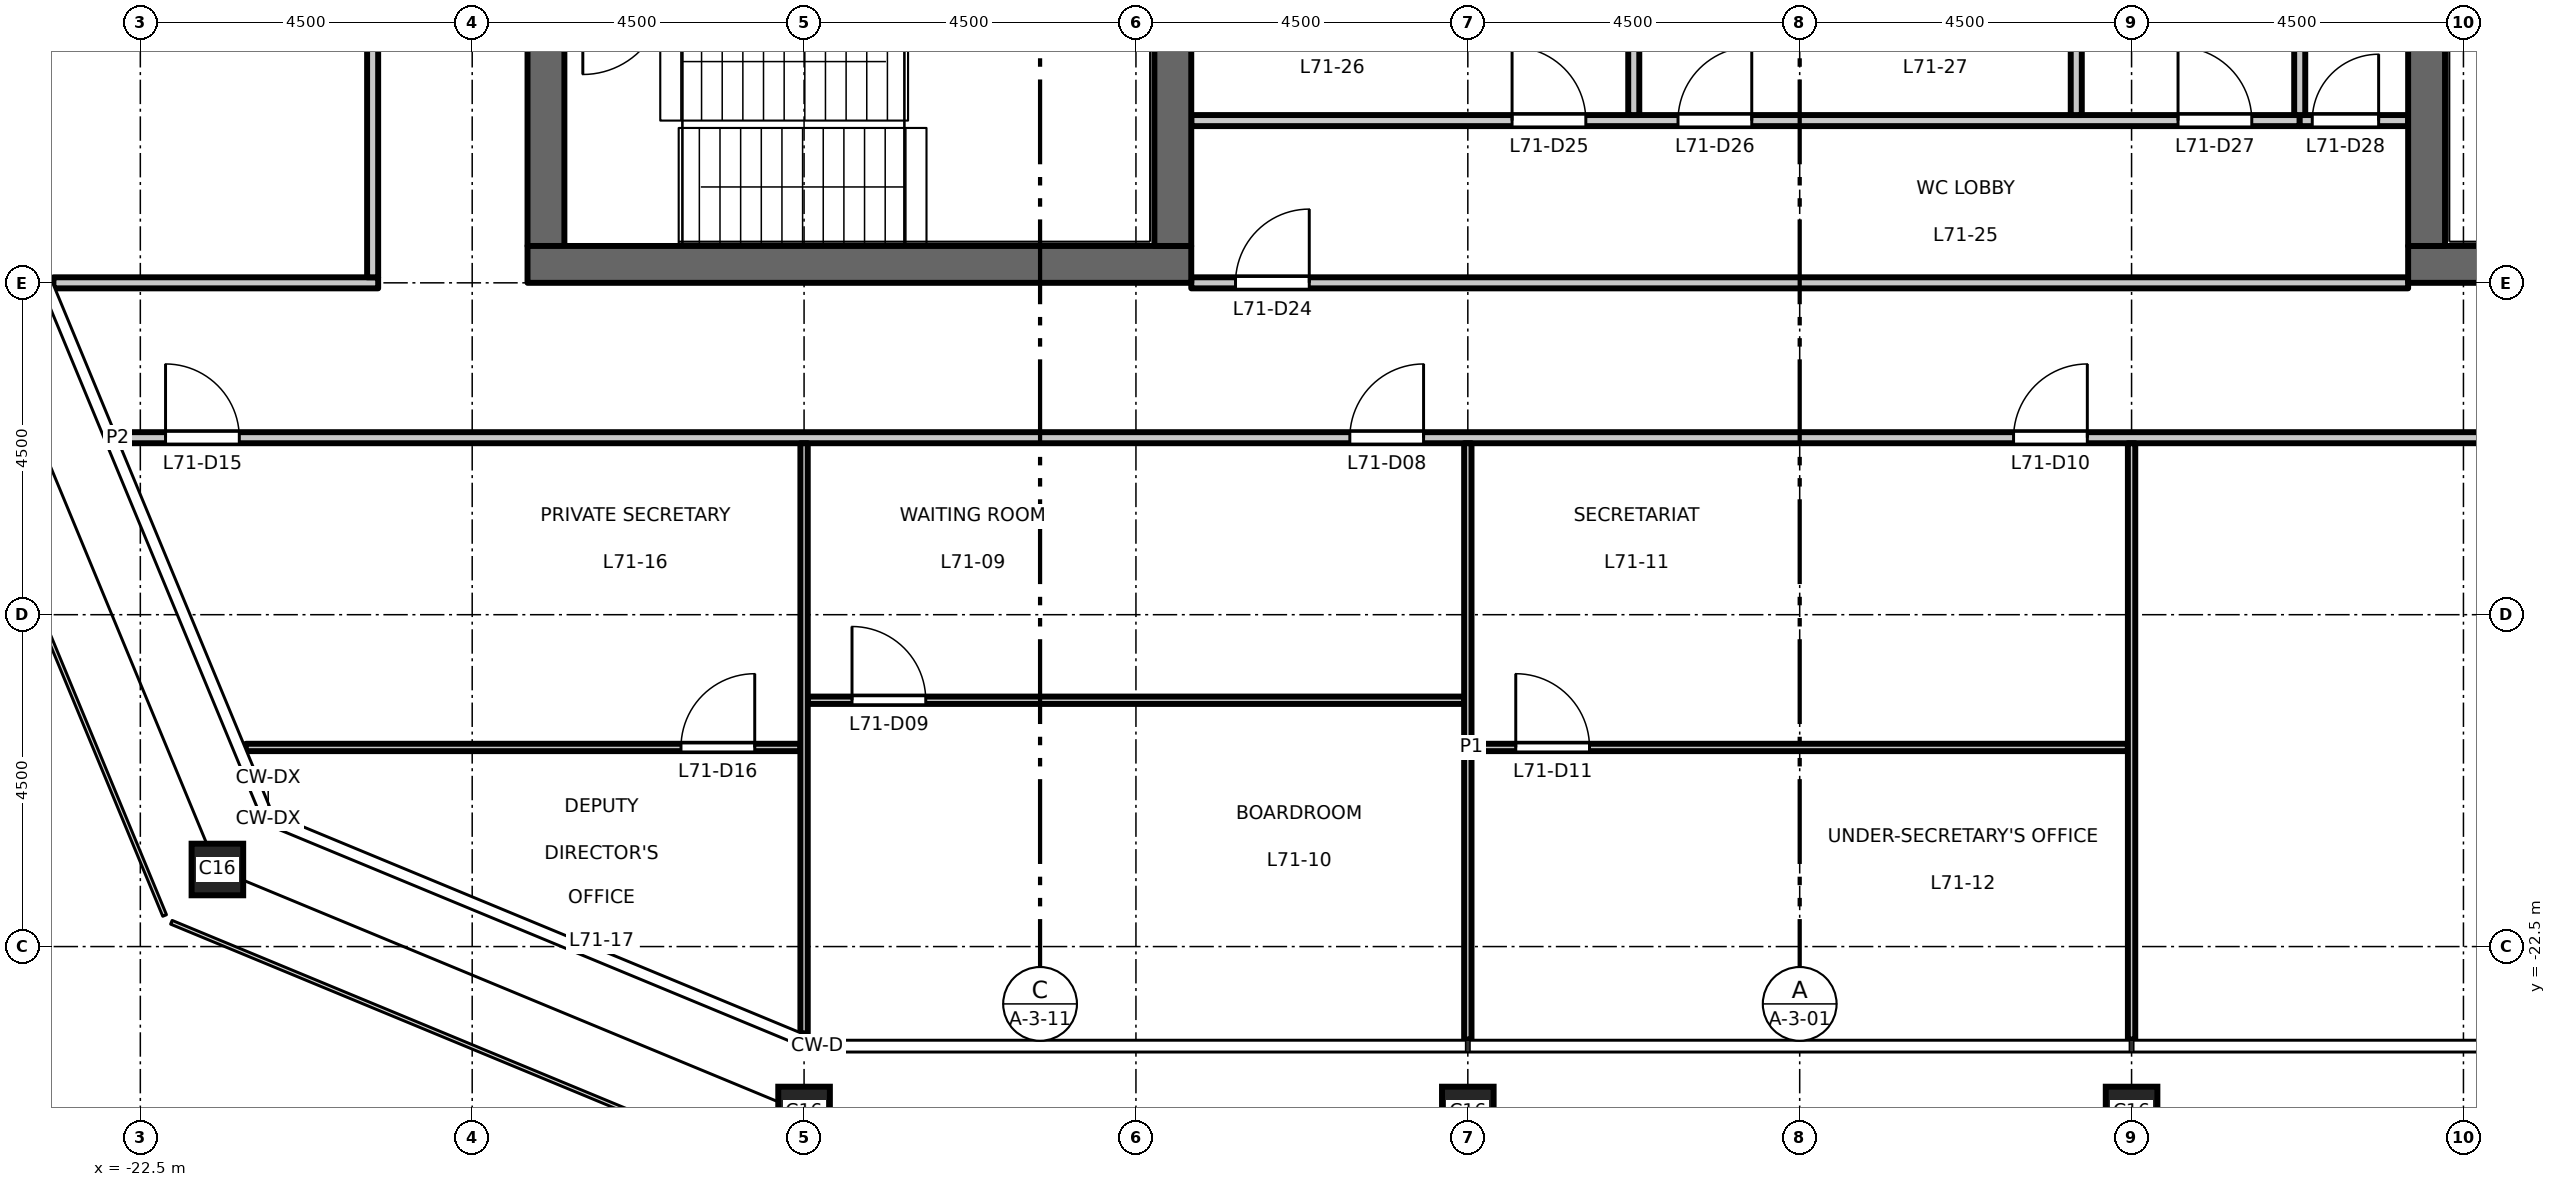
"""IFC4 building model, lengths in metres.
Left out: names, types, materials, properties, quantities, classifications, styles, units other than length and angle.
Written with IfcOpenShell. Run it as: python <this file> out.ifc"""

import sys

from ifc_helpers import new_model, si_unit, direction, frame, frame_2d, origin, origin_2d, place, context, subcontext, project, spatial, rectangle, hollow_rectangle, extrude, element, fill, save


model = new_model("IFC4")
c1 = context("Model", 3, precision=1e-05, world=origin(), true_north=direction((0.0, 1.0)))
c2 = subcontext(c1, "Body", "Model", "MODEL_VIEW")
j1 = project(units=[si_unit("LENGTHUNIT", "METRE"), si_unit("PLANEANGLEUNIT", "RADIAN")], contexts=[c1])
p1 = place(None, origin())
s1 = spatial("IfcSite", under=j1, at=p1, CompositionType="ELEMENT")
p2 = place(p1, origin())
s2 = spatial("IfcBuilding", under=s1, at=p2, CompositionType="ELEMENT")
p3 = place(p2, frame((0.0, 0.0, 330.2)))
s3 = spatial("IfcBuildingStorey", under=s2, at=p3, CompositionType="ELEMENT", Elevation=330.2)
for number, where, z_axis, x_axis in (
    (1, (-13.5, -24.75, 0.0), (0.0, 0.0, 1.0), (1.0, 0.0, 0.0)),
    (2, (-4.5, -24.75, 0.0), (0.0, 0.0, 1.0), (1.0, 0.0, 0.0)),
    (3, (4.5, -24.75, 0.0), (0.0, 0.0, 1.0), (1.0, 0.0, 0.0)),
    (4, (-21.455, -21.455, 0.0), (0.0, 0.0, 1.0), (1.0, 0.0, 0.0)),
):
    element("IfcColumn", number, at=place(p3, frame(where, z_axis=z_axis, x_axis=x_axis)), inside=s3, PredefinedType="COLUMN", context=c2, shape_type="SweptSolid", body=[
        extrude(hollow_rectangle(XDim=0.7, YDim=0.7, WallThickness=0.036, at=origin_2d()), origin(), (0.0, 0.0, 1.0), 4.5),
    ])
p4 = place(p3, frame((-17.0, -13.0, 0.0), z_axis=(0.0, 0.0, 1.0), x_axis=(0.0, 1.0, 0.0)))
e5 = element("IfcWall", 5, at=p4, inside=s3, PredefinedType="SHEAR", context=c2, shape_type="SweptSolid", body=[
    extrude(rectangle(XDim=26.0, YDim=0.5, at=frame_2d((13.0, 0.0))), origin(), (0.0, 0.0, 1.0), 4.35),
])
p5 = place(p4, frame((16.825, 0.0, 0.0)))
e6 = element("IfcOpeningElement", 6, at=p5, cuts=e5, PredefinedType="OPENING", context=c2, shape_type="SweptSolid", body=[
    extrude(rectangle(XDim=1.8, YDim=2.1, at=frame_2d((0.9, 1.05))), frame((0.0, 0.26, 0.0), z_axis=(0.0, -1.0, 0.0), x_axis=(1.0, 0.0, 0.0)), (0.0, 0.0, 1.0), 0.52),
])
p6 = place(p4, frame((7.375, 0.0, 0.0)))
e7 = element("IfcOpeningElement", 7, at=p6, cuts=e5, PredefinedType="OPENING", context=c2, shape_type="SweptSolid", body=[
    extrude(rectangle(XDim=1.8, YDim=2.1, at=frame_2d((0.9, 1.05))), frame((0.0, 0.26, 0.0), z_axis=(0.0, -1.0, 0.0), x_axis=(1.0, 0.0, 0.0)), (0.0, 0.0, 1.0), 0.52),
])
p7 = place(p3, frame((-8.25, -13.25, 0.0), z_axis=(0.0, 0.0, 1.0), x_axis=(-1.0, 0.0, 0.0)))
e8 = element("IfcWall", 8, at=p7, inside=s3, PredefinedType="SHEAR", context=c2, shape_type="SweptSolid", body=[
    extrude(rectangle(XDim=9.0, YDim=0.5, at=frame_2d((4.5, 0.0))), origin(), (0.0, 0.0, 1.0), 4.35),
])
p8 = place(p3, frame((-8.5, -13.0, 0.0), z_axis=(0.0, 0.0, 1.0), x_axis=(0.0, 1.0, 0.0)))
e9 = element("IfcWall", 9, at=p8, inside=s3, PredefinedType="SHEAR", context=c2, shape_type="SweptSolid", body=[
    extrude(rectangle(XDim=26.0, YDim=0.5, at=frame_2d((13.0, 0.0))), origin(), (0.0, 0.0, 1.0), 4.35),
])
p9 = place(p3, frame((8.25, -13.25, 0.0), z_axis=(0.0, 0.0, 1.0), x_axis=(1.0, 0.0, 0.0)))
e10 = element("IfcWall", 10, at=p9, inside=s3, PredefinedType="SHEAR", context=c2, shape_type="SweptSolid", body=[
    extrude(rectangle(XDim=9.0, YDim=0.5, at=frame_2d((4.5, 0.0))), origin(), (0.0, 0.0, 1.0), 4.35),
])
p10 = place(p3, frame((8.5, -13.0, 0.0), z_axis=(0.0, 0.0, 1.0), x_axis=(0.0, 1.0, 0.0)))
e11 = element("IfcWall", 11, at=p10, inside=s3, PredefinedType="SHEAR", context=c2, shape_type="SweptSolid", body=[
    extrude(rectangle(XDim=26.0, YDim=0.5, at=frame_2d((13.0, 0.0))), origin(), (0.0, 0.0, 1.0), 4.35),
])
p11 = place(p3, frame((-21.069, -19.8, 0.0), z_axis=(0.0, 0.0, 1.0), x_axis=(1.0, 0.0, 0.0)))
e12 = element("IfcWall", 12, at=p11, inside=s3, PredefinedType="PARTITIONING", context=c2, shape_type="SweptSolid", body=[
    extrude(rectangle(XDim=7.519, YDim=0.1, at=frame_2d((3.76, 0.0))), origin(), (0.0, 0.0, 1.0), 4.35),
])
p12 = place(p11, frame((5.9, 0.0, 0.0)))
e13 = element("IfcOpeningElement", 13, at=p12, cuts=e12, PredefinedType="OPENING", context=c2, shape_type="SweptSolid", body=[
    extrude(rectangle(XDim=1.0, YDim=2.1, at=frame_2d((0.5, 1.05))), frame((0.0, 0.06, 0.0), z_axis=(0.0, -1.0, 0.0), x_axis=(1.0, 0.0, 0.0)), (0.0, 0.0, 1.0), 0.12),
])
p13 = place(p3, frame((-4.45, -19.8, 0.0), z_axis=(0.0, 0.0, 1.0), x_axis=(1.0, 0.0, 0.0)))
e14 = element("IfcWall", 14, at=p13, inside=s3, PredefinedType="PARTITIONING", context=c2, shape_type="SweptSolid", body=[
    extrude(rectangle(XDim=8.9, YDim=0.1, at=frame_2d((4.45, 0.0))), origin(), (0.0, 0.0, 1.0), 4.35),
])
p14 = place(p13, frame((0.6, 0.0, 0.0)))
e15 = element("IfcOpeningElement", 15, at=p14, cuts=e14, PredefinedType="OPENING", context=c2, shape_type="SweptSolid", body=[
    extrude(rectangle(XDim=1.0, YDim=2.1, at=frame_2d((0.5, 1.05))), frame((0.0, 0.06, 0.0), z_axis=(0.0, -1.0, 0.0), x_axis=(1.0, 0.0, 0.0)), (0.0, 0.0, 1.0), 0.12),
])
p15 = place(p3, frame((-13.45, -19.16, 0.0), z_axis=(0.0, 0.0, 1.0), x_axis=(1.0, 0.0, 0.0)))
e16 = element("IfcWall", 16, at=p15, inside=s3, PredefinedType="PARTITIONING", context=c2, shape_type="SweptSolid", body=[
    extrude(rectangle(XDim=8.9, YDim=0.1, at=frame_2d((4.45, 0.0))), origin(), (0.0, 0.0, 1.0), 4.35),
])
p16 = place(p15, frame((0.6, 0.0, 0.0)))
e17 = element("IfcOpeningElement", 17, at=p16, cuts=e16, PredefinedType="OPENING", context=c2, shape_type="SweptSolid", body=[
    extrude(rectangle(XDim=1.0, YDim=2.1, at=frame_2d((0.5, 1.05))), frame((0.0, 0.06, 0.0), z_axis=(0.0, -1.0, 0.0), x_axis=(1.0, 0.0, 0.0)), (0.0, 0.0, 1.0), 0.12),
])
p17 = place(p3, frame((-22.808, -15.6, 0.0), z_axis=(0.0, 0.0, 1.0), x_axis=(1.0, 0.0, 0.0)))
e18 = element("IfcWall", 18, at=p17, inside=s3, PredefinedType="PARTITIONING", context=c2, shape_type="SweptSolid", body=[
    extrude(rectangle(XDim=45.616, YDim=0.15, at=frame_2d((22.808, 0.0))), origin(), (0.0, 0.0, 1.0), 4.35),
])
p18 = place(p17, frame((16.708, 0.0, 0.0)))
e19 = element("IfcOpeningElement", 19, at=p18, cuts=e18, PredefinedType="OPENING", context=c2, shape_type="SweptSolid", body=[
    extrude(rectangle(XDim=1.0, YDim=2.1, at=frame_2d((0.5, 1.05))), frame((0.0, 0.085, 0.0), z_axis=(0.0, -1.0, 0.0), x_axis=(1.0, 0.0, 0.0)), (0.0, 0.0, 1.0), 0.17),
])
p19 = place(p17, frame((25.708, 0.0, 0.0)))
e20 = element("IfcOpeningElement", 20, at=p19, cuts=e18, PredefinedType="OPENING", context=c2, shape_type="SweptSolid", body=[
    extrude(rectangle(XDim=1.0, YDim=2.1, at=frame_2d((0.5, 1.05))), frame((0.0, 0.085, 0.0), z_axis=(0.0, -1.0, 0.0), x_axis=(1.0, 0.0, 0.0)), (0.0, 0.0, 1.0), 0.17),
])
p20 = place(p17, frame((34.708, 0.0, 0.0)))
e21 = element("IfcOpeningElement", 21, at=p20, cuts=e18, PredefinedType="OPENING", context=c2, shape_type="SweptSolid", body=[
    extrude(rectangle(XDim=1.0, YDim=2.1, at=frame_2d((0.5, 1.05))), frame((0.0, 0.085, 0.0), z_axis=(0.0, -1.0, 0.0), x_axis=(1.0, 0.0, 0.0)), (0.0, 0.0, 1.0), 0.17),
])
p21 = place(p17, frame((0.65, 0.0, 0.0)))
e22 = element("IfcOpeningElement", 22, at=p21, cuts=e18, PredefinedType="OPENING", context=c2, shape_type="SweptSolid", body=[
    extrude(rectangle(XDim=1.0, YDim=2.1, at=frame_2d((0.5, 1.05))), frame((0.0, 0.085, 0.0), z_axis=(0.0, -1.0, 0.0), x_axis=(1.0, 0.0, 0.0)), (0.0, 0.0, 1.0), 0.17),
])
p22 = place(p17, frame((36.958, 0.0, 0.0)))
e23 = element("IfcOpeningElement", 23, at=p22, cuts=e18, PredefinedType="OPENING", context=c2, shape_type="SweptSolid", body=[
    extrude(rectangle(XDim=1.0, YDim=2.1, at=frame_2d((0.5, 1.05))), frame((0.0, 0.085, 0.0), z_axis=(0.0, -1.0, 0.0), x_axis=(1.0, 0.0, 0.0)), (0.0, 0.0, 1.0), 0.17),
])
p23 = place(p3, frame((-23.678, -13.5, 0.0), z_axis=(0.0, 0.0, 1.0), x_axis=(1.0, 0.0, 0.0)))
e24 = element("IfcWall", 24, at=p23, inside=s3, PredefinedType="PARTITIONING", context=c2, shape_type="SweptSolid", body=[
    extrude(rectangle(XDim=4.403, YDim=0.15, at=frame_2d((2.202, 0.0))), origin(), (0.0, 0.0, 1.0), 4.35),
])
p24 = place(p3, frame((-8.25, -13.5, 0.0), z_axis=(0.0, 0.0, 1.0), x_axis=(1.0, 0.0, 0.0)))
e25 = element("IfcWall", 25, at=p24, inside=s3, PredefinedType="PARTITIONING", context=c2, shape_type="SweptSolid", body=[
    extrude(rectangle(XDim=16.5, YDim=0.15, at=frame_2d((8.25, 0.0))), origin(), (0.0, 0.0, 1.0), 4.35),
])
p25 = place(p24, frame((0.6, 0.0, 0.0)))
e26 = element("IfcOpeningElement", 26, at=p25, cuts=e25, PredefinedType="OPENING", context=c2, shape_type="SweptSolid", body=[
    extrude(rectangle(XDim=1.0, YDim=2.1, at=frame_2d((0.5, 1.05))), frame((0.0, 0.085, 0.0), z_axis=(0.0, -1.0, 0.0), x_axis=(1.0, 0.0, 0.0)), (0.0, 0.0, 1.0), 0.17),
])
p26 = place(p3, frame((-8.25, -11.3, 0.0), z_axis=(0.0, 0.0, 1.0), x_axis=(1.0, 0.0, 0.0)))
e27 = element("IfcWall", 27, at=p26, inside=s3, PredefinedType="PARTITIONING", context=c2, shape_type="SweptSolid", body=[
    extrude(rectangle(XDim=15.03, YDim=0.15, at=frame_2d((7.515, 0.0))), origin(), (0.0, 0.0, 1.0), 4.35),
])
p27 = place(p26, frame((4.35, 0.0, 0.0)))
e28 = element("IfcOpeningElement", 28, at=p27, cuts=e27, PredefinedType="OPENING", context=c2, shape_type="SweptSolid", body=[
    extrude(rectangle(XDim=1.0, YDim=2.1, at=frame_2d((0.5, 1.05))), frame((0.0, 0.085, 0.0), z_axis=(0.0, -1.0, 0.0), x_axis=(1.0, 0.0, 0.0)), (0.0, 0.0, 1.0), 0.17),
])
p28 = place(p26, frame((6.6, 0.0, 0.0)))
e29 = element("IfcOpeningElement", 29, at=p28, cuts=e27, PredefinedType="OPENING", context=c2, shape_type="SweptSolid", body=[
    extrude(rectangle(XDim=1.0, YDim=2.1, at=frame_2d((0.5, 1.05))), frame((0.0, 0.085, 0.0), z_axis=(0.0, -1.0, 0.0), x_axis=(1.0, 0.0, 0.0)), (0.0, 0.0, 1.0), 0.17),
])
p29 = place(p26, frame((13.38, 0.0, 0.0)))
e30 = element("IfcOpeningElement", 30, at=p29, cuts=e27, PredefinedType="OPENING", context=c2, shape_type="SweptSolid", body=[
    extrude(rectangle(XDim=1.0, YDim=2.1, at=frame_2d((0.5, 1.05))), frame((0.0, 0.085, 0.0), z_axis=(0.0, -1.0, 0.0), x_axis=(1.0, 0.0, 0.0)), (0.0, 0.0, 1.0), 0.17),
])
p30 = place(p3, frame((6.78, -11.3, 0.0), z_axis=(0.0, 0.0, 1.0), x_axis=(1.0, 0.0, 0.0)))
e31 = element("IfcWall", 31, at=p30, inside=s3, PredefinedType="PARTITIONING", context=c2, shape_type="SweptSolid", body=[
    extrude(rectangle(XDim=1.47, YDim=0.15, at=frame_2d((0.735, 0.0))), origin(), (0.0, 0.0, 1.0), 4.35),
])
p31 = place(p30, frame((0.17, 0.0, 0.0)))
e32 = element("IfcOpeningElement", 32, at=p31, cuts=e31, PredefinedType="OPENING", context=c2, shape_type="SweptSolid", body=[
    extrude(rectangle(XDim=0.9, YDim=2.1, at=frame_2d((0.45, 1.05))), frame((0.0, 0.085, 0.0), z_axis=(0.0, -1.0, 0.0), x_axis=(1.0, 0.0, 0.0)), (0.0, 0.0, 1.0), 0.17),
])
p32 = place(p3, frame((-19.35, -13.425, 0.0), z_axis=(0.0, 0.0, 1.0), x_axis=(0.0, 1.0, 0.0)))
e33 = element("IfcWall", 33, at=p32, inside=s3, PredefinedType="PARTITIONING", context=c2, shape_type="SweptSolid", body=[
    extrude(rectangle(XDim=26.85, YDim=0.15, at=frame_2d((13.425, 0.0))), origin(), (0.0, 0.0, 1.0), 4.35),
])
p33 = place(p32, frame((25.275, 0.0, 0.0)))
e34 = element("IfcOpeningElement", 34, at=p33, cuts=e33, PredefinedType="OPENING", context=c2, shape_type="SweptSolid", body=[
    extrude(rectangle(XDim=1.0, YDim=2.1, at=frame_2d((0.5, 1.05))), frame((0.0, 0.085, 0.0), z_axis=(0.0, -1.0, 0.0), x_axis=(1.0, 0.0, 0.0)), (0.0, 0.0, 1.0), 0.17),
])
p34 = place(p3, frame((-13.5, -23.678, 0.0), z_axis=(0.0, 0.0, 1.0), x_axis=(0.0, 1.0, 0.0)))
e35 = element("IfcWall", 35, at=p34, inside=s3, PredefinedType="PARTITIONING", context=c2, shape_type="SweptSolid", body=[
    extrude(rectangle(XDim=8.003, YDim=0.1, at=frame_2d((4.001, 0.0))), origin(), (0.0, 0.0, 1.0), 3.75),
])
p35 = place(p3, frame((-4.5, -23.76, 0.0), z_axis=(0.0, 0.0, 1.0), x_axis=(0.0, 1.0, 0.0)))
e36 = element("IfcWall", 36, at=p35, inside=s3, PredefinedType="PARTITIONING", context=c2, shape_type="SweptSolid", body=[
    extrude(rectangle(XDim=8.085, YDim=0.1, at=frame_2d((4.042, 0.0))), origin(), (0.0, 0.0, 1.0), 3.65),
])
for number, where, z_axis, x_axis in (
    (37, (-2.25, -11.225, 0.0), (0.0, 0.0, 1.0), (0.0, 1.0, 0.0)),
    (38, (3.75, -11.225, 0.0), (0.0, 0.0, 1.0), (0.0, 1.0, 0.0)),
):
    element("IfcWall", number, at=place(p3, frame(where, z_axis=z_axis, x_axis=x_axis)), inside=s3, PredefinedType="PARTITIONING", context=c2, shape_type="SweptSolid", body=[
        extrude(rectangle(XDim=2.855, YDim=0.15, at=frame_2d((1.427, 0.0))), origin(), (0.0, 0.0, 1.0), 4.35),
    ])
p36 = place(p3, frame((4.5, -23.76, 0.0), z_axis=(0.0, 0.0, 1.0), x_axis=(0.0, 1.0, 0.0)))
e39 = element("IfcWall", 39, at=p36, inside=s3, PredefinedType="PARTITIONING", context=c2, shape_type="SweptSolid", body=[
    extrude(rectangle(XDim=8.085, YDim=0.1, at=frame_2d((4.042, 0.0))), origin(), (0.0, 0.0, 1.0), 3.65),
])
p37 = place(p3, frame((6.78, -11.225, 0.0), z_axis=(0.0, 0.0, 1.0), x_axis=(0.0, 1.0, 0.0)))
e40 = element("IfcWall", 40, at=p37, inside=s3, PredefinedType="PARTITIONING", context=c2, shape_type="SweptSolid", body=[
    extrude(rectangle(XDim=3.138, YDim=0.15, at=frame_2d((1.569, 0.0))), origin(), (0.0, 0.0, 1.0), 4.35),
])
p38 = place(p18, origin())
e41 = element("IfcDoor", 41, at=p38, inside=s3, OperationType="SINGLE_SWING_RIGHT", PredefinedType="DOOR", context=c2, shape_type="SweptSolid", body=[
    extrude(rectangle(XDim=1.0, YDim=2.1, at=frame_2d((0.5, 1.05))), frame((0.0, 0.025, 0.0), z_axis=(0.0, -1.0, 0.0), x_axis=(1.0, 0.0, 0.0)), (0.0, 0.0, 1.0), 0.05),
])
fill(e19, e41)
p39 = place(p16, origin())
e42 = element("IfcDoor", 42, at=p39, inside=s3, OperationType="SINGLE_SWING_LEFT", PredefinedType="DOOR", context=c2, shape_type="SweptSolid", body=[
    extrude(rectangle(XDim=1.0, YDim=2.1, at=frame_2d((0.5, 1.05))), frame((0.0, 0.025, 0.0), z_axis=(0.0, -1.0, 0.0), x_axis=(1.0, 0.0, 0.0)), (0.0, 0.0, 1.0), 0.05),
])
fill(e17, e42)
p40 = place(p19, origin())
e43 = element("IfcDoor", 43, at=p40, inside=s3, OperationType="SINGLE_SWING_RIGHT", PredefinedType="DOOR", context=c2, shape_type="SweptSolid", body=[
    extrude(rectangle(XDim=1.0, YDim=2.1, at=frame_2d((0.5, 1.05))), frame((0.0, 0.025, 0.0), z_axis=(0.0, -1.0, 0.0), x_axis=(1.0, 0.0, 0.0)), (0.0, 0.0, 1.0), 0.05),
])
fill(e20, e43)
p41 = place(p14, origin())
e44 = element("IfcDoor", 44, at=p41, inside=s3, OperationType="SINGLE_SWING_LEFT", PredefinedType="DOOR", context=c2, shape_type="SweptSolid", body=[
    extrude(rectangle(XDim=1.0, YDim=2.1, at=frame_2d((0.5, 1.05))), frame((0.0, 0.025, 0.0), z_axis=(0.0, -1.0, 0.0), x_axis=(1.0, 0.0, 0.0)), (0.0, 0.0, 1.0), 0.05),
])
fill(e15, e44)
p42 = place(p21, origin())
e45 = element("IfcDoor", 45, at=p42, inside=s3, OperationType="SINGLE_SWING_LEFT", PredefinedType="DOOR", context=c2, shape_type="SweptSolid", body=[
    extrude(rectangle(XDim=1.0, YDim=2.1, at=frame_2d((0.5, 1.05))), frame((0.0, 0.025, 0.0), z_axis=(0.0, -1.0, 0.0), x_axis=(1.0, 0.0, 0.0)), (0.0, 0.0, 1.0), 0.05),
])
fill(e22, e45)
p43 = place(p12, origin())
e46 = element("IfcDoor", 46, at=p43, inside=s3, OperationType="SINGLE_SWING_RIGHT", PredefinedType="DOOR", context=c2, shape_type="SweptSolid", body=[
    extrude(rectangle(XDim=1.0, YDim=2.1, at=frame_2d((0.5, 1.05))), frame((0.0, 0.025, 0.0), z_axis=(0.0, -1.0, 0.0), x_axis=(1.0, 0.0, 0.0)), (0.0, 0.0, 1.0), 0.05),
])
fill(e13, e46)
p44 = place(p25, origin())
e47 = element("IfcDoor", 47, at=p44, inside=s3, OperationType="SINGLE_SWING_RIGHT", PredefinedType="DOOR", context=c2, shape_type="SweptSolid", body=[
    extrude(rectangle(XDim=1.0, YDim=2.1, at=frame_2d((0.5, 1.05))), frame((0.0, 0.025, 0.0), z_axis=(0.0, -1.0, 0.0), x_axis=(1.0, 0.0, 0.0)), (0.0, 0.0, 1.0), 0.05),
])
fill(e26, e47)
p45 = place(p27, origin())
e48 = element("IfcDoor", 48, at=p45, inside=s3, OperationType="SINGLE_SWING_LEFT", PredefinedType="DOOR", context=c2, shape_type="SweptSolid", body=[
    extrude(rectangle(XDim=1.0, YDim=2.1, at=frame_2d((0.5, 1.05))), frame((0.0, 0.025, 0.0), z_axis=(0.0, -1.0, 0.0), x_axis=(1.0, 0.0, 0.0)), (0.0, 0.0, 1.0), 0.05),
])
fill(e28, e48)
p46 = place(p28, origin())
e49 = element("IfcDoor", 49, at=p46, inside=s3, OperationType="SINGLE_SWING_RIGHT", PredefinedType="DOOR", context=c2, shape_type="SweptSolid", body=[
    extrude(rectangle(XDim=1.0, YDim=2.1, at=frame_2d((0.5, 1.05))), frame((0.0, 0.025, 0.0), z_axis=(0.0, -1.0, 0.0), x_axis=(1.0, 0.0, 0.0)), (0.0, 0.0, 1.0), 0.05),
])
fill(e29, e49)
p47 = place(p29, origin())
e50 = element("IfcDoor", 50, at=p47, inside=s3, OperationType="SINGLE_SWING_LEFT", PredefinedType="DOOR", context=c2, shape_type="SweptSolid", body=[
    extrude(rectangle(XDim=1.0, YDim=2.1, at=frame_2d((0.5, 1.05))), frame((0.0, 0.025, 0.0), z_axis=(0.0, -1.0, 0.0), x_axis=(1.0, 0.0, 0.0)), (0.0, 0.0, 1.0), 0.05),
])
fill(e30, e50)
p48 = place(p31, origin())
e51 = element("IfcDoor", 51, at=p48, inside=s3, OperationType="SINGLE_SWING_RIGHT", PredefinedType="DOOR", context=c2, shape_type="SweptSolid", body=[
    extrude(rectangle(XDim=0.9, YDim=2.1, at=frame_2d((0.45, 1.05))), frame((0.0, 0.025, 0.0), z_axis=(0.0, -1.0, 0.0), x_axis=(1.0, 0.0, 0.0)), (0.0, 0.0, 1.0), 0.05),
])
fill(e32, e51)
save(model, sys.argv[1])
